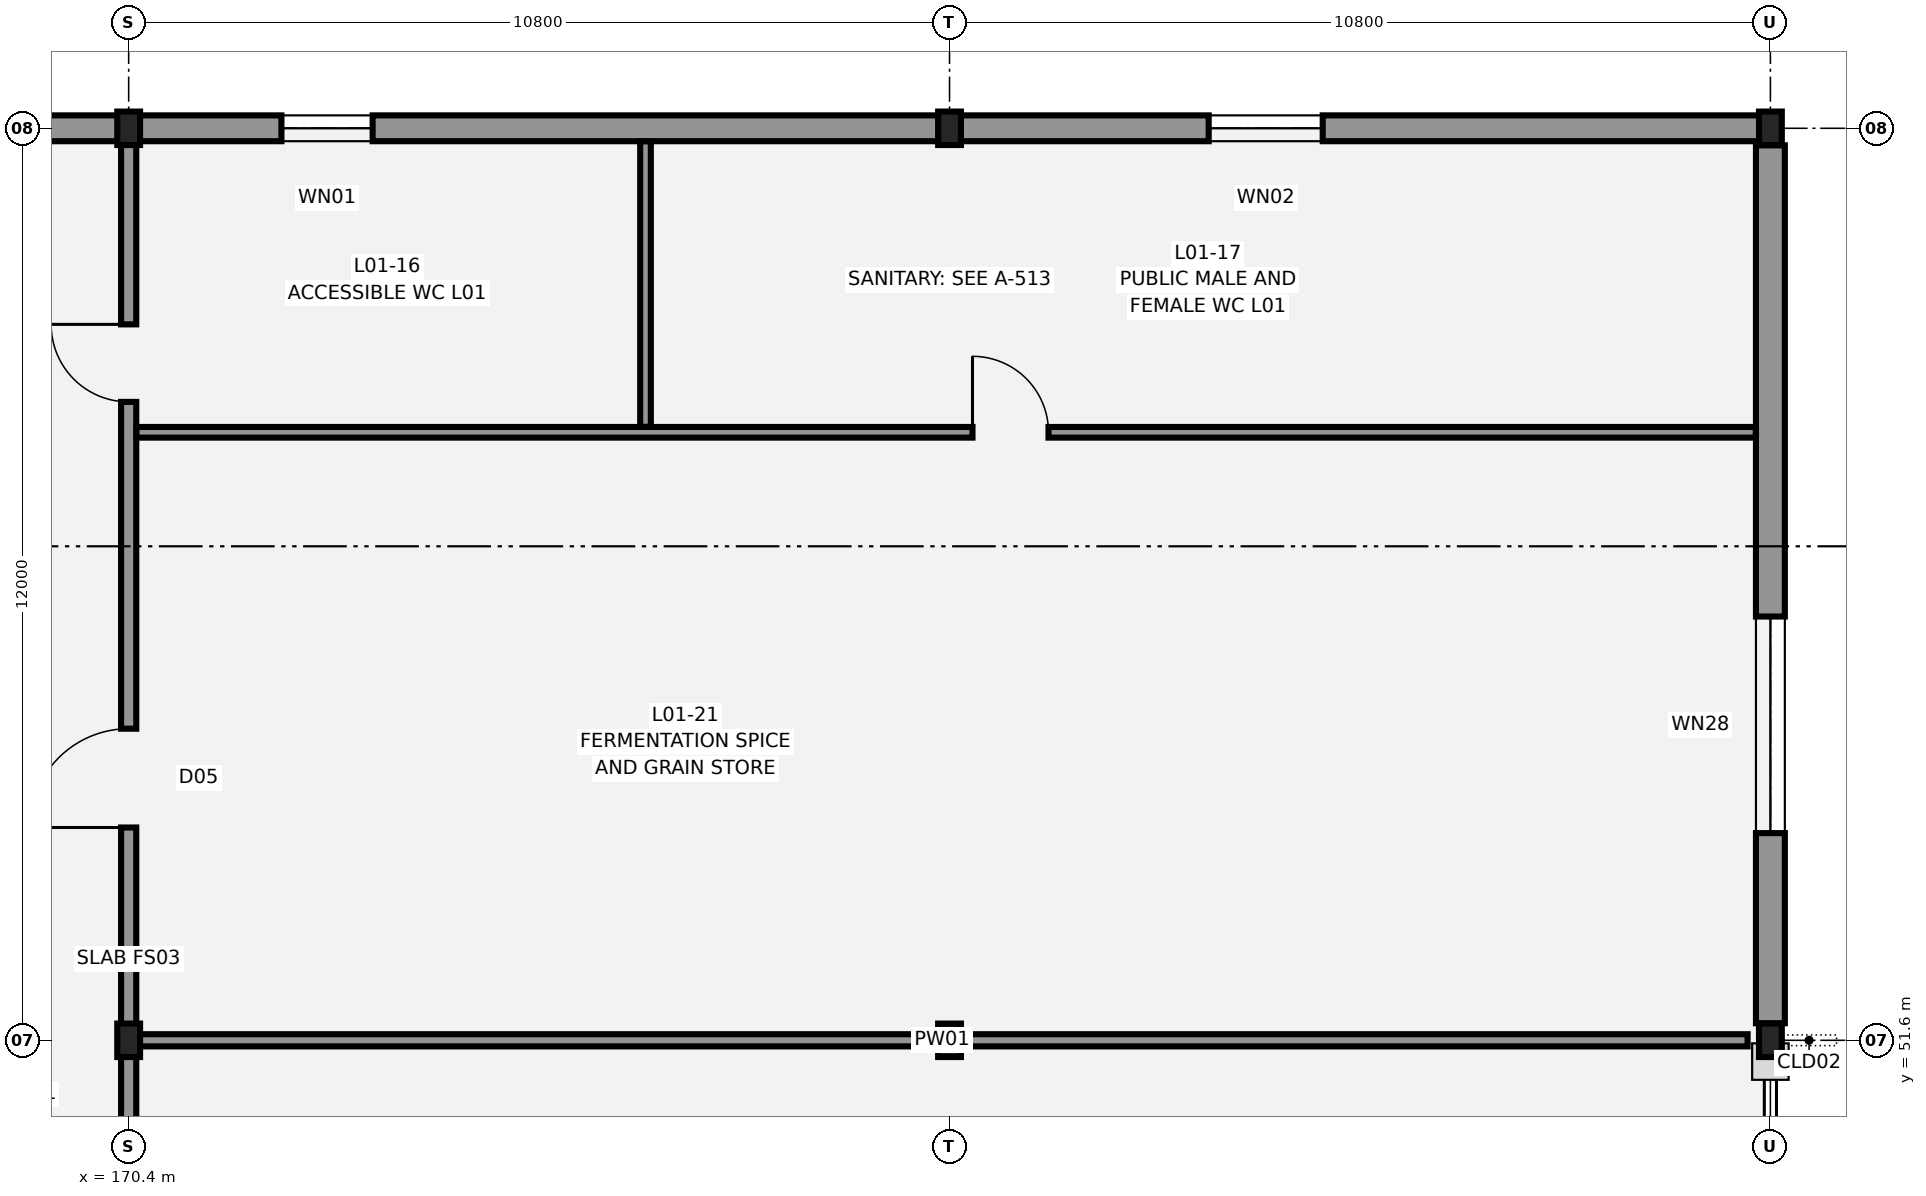
"""IFC4 building model, lengths in metres.
Left out: names, types, materials, properties, quantities, classifications, styles, units other than length and angle.
Written with IfcOpenShell. Run it as: python <this file> out.ifc"""

import sys

from ifc_helpers import new_model, si_unit, direction, frame, frame_2d, origin, origin_2d, place, context, subcontext, project, spatial, rectangle, i_section, extrude, element, fill, save


model = new_model("IFC4")
c1 = context("Model", 3, precision=1e-05, world=origin(), true_north=direction((0.0, 1.0)))
c2 = subcontext(c1, "Body", "Model", "MODEL_VIEW")
j1 = project(units=[si_unit("LENGTHUNIT", "METRE"), si_unit("PLANEANGLEUNIT", "RADIAN")], contexts=[c1])
p1 = place(None, origin())
s1 = spatial("IfcSite", under=j1, at=p1, CompositionType="ELEMENT")
p2 = place(p1, origin())
s2 = spatial("IfcBuilding", under=s1, at=p2, CompositionType="ELEMENT")
p3 = place(p2, frame((0.0, 0.0, 5.4)))
s3 = spatial("IfcBuildingStorey", under=s2, at=p3, CompositionType="ELEMENT", Elevation=5.4)
for number, where, z_axis, x_axis in (
    (1, (170.4, 51.6, 0.0), (0.0, 0.0, 1.0), (1.0, 0.0, 0.0)),
    (2, (170.4, 63.6, 0.0), (0.0, 0.0, 1.0), (1.0, 0.0, 0.0)),
    (3, (181.2, 51.6, 0.0), (0.0, 0.0, 1.0), (1.0, 0.0, 0.0)),
    (4, (181.2, 63.6, 0.0), (0.0, 0.0, 1.0), (1.0, 0.0, 0.0)),
    (5, (192.0, 51.6, 0.0), (0.0, 0.0, 1.0), (1.0, 0.0, 0.0)),
    (6, (192.0, 63.6, 0.0), (0.0, 0.0, 1.0), (1.0, 0.0, 0.0)),
):
    element("IfcColumn", number, at=place(p3, frame(where, z_axis=z_axis, x_axis=x_axis)), inside=s3, PredefinedType="COLUMN", context=c2, shape_type="SweptSolid", body=[
        extrude(i_section(OverallWidth=0.3, OverallDepth=0.44, WebThickness=0.011, FlangeThickness=0.021, FilletRadius=0.027, at=origin_2d()), origin(), (0.0, 0.0, 1.0), 4.8),
    ])
p4 = place(p3, frame((192.0, 63.376, 0.0), z_axis=(0.0, 0.0, 1.0), x_axis=(0.0, -1.0, 0.0)))
e7 = element("IfcWall", 7, at=p4, inside=s3, PredefinedType="STANDARD", context=c2, shape_type="SweptSolid", body=[
    extrude(rectangle(XDim=11.552, YDim=0.38, at=frame_2d((5.776, 0.0))), origin(), (0.0, 0.0, 1.0), 4.48),
])
p5 = place(p4, frame((6.2, 0.0, 0.8)))
e8 = element("IfcOpeningElement", 8, at=p5, cuts=e7, PredefinedType="OPENING", context=c2, shape_type="SweptSolid", body=[
    extrude(rectangle(XDim=2.85, YDim=1.65, at=frame_2d((1.425, 0.825))), frame((0.0, 0.2, 0.0), z_axis=(0.0, -1.0, 0.0), x_axis=(1.0, 0.0, 0.0)), (0.0, 0.0, 1.0), 0.4),
])
p6 = place(p3, frame((159.61, 63.6, 0.0), z_axis=(0.0, 0.0, 1.0), x_axis=(1.0, 0.0, 0.0)))
e9 = element("IfcWall", 9, at=p6, inside=s3, PredefinedType="STANDARD", context=c2, shape_type="SweptSolid", body=[
    extrude(rectangle(XDim=10.781, YDim=0.34, at=frame_2d((5.39, 0.0))), origin(), (0.0, 0.0, 1.0), 4.48),
])
p7 = place(p6, frame((3.4, 0.0, 0.8)))
e10 = element("IfcOpeningElement", 10, at=p7, cuts=e9, PredefinedType="OPENING", context=c2, shape_type="SweptSolid", body=[
    extrude(rectangle(XDim=1.75, YDim=1.5, at=frame_2d((0.875, 0.75))), frame((0.0, 0.18, 0.0), z_axis=(0.0, -1.0, 0.0), x_axis=(1.0, 0.0, 0.0)), (0.0, 0.0, 1.0), 0.36),
])
p8 = place(p3, frame((170.41, 63.6, 0.0), z_axis=(0.0, 0.0, 1.0), x_axis=(1.0, 0.0, 0.0)))
e11 = element("IfcWall", 11, at=p8, inside=s3, PredefinedType="STANDARD", context=c2, shape_type="SweptSolid", body=[
    extrude(rectangle(XDim=10.78, YDim=0.34, at=frame_2d((5.39, 0.0))), origin(), (0.0, 0.0, 1.0), 4.48),
])
p9 = place(p8, frame((2.0, 0.0, 0.8)))
e12 = element("IfcOpeningElement", 12, at=p9, cuts=e11, PredefinedType="OPENING", context=c2, shape_type="SweptSolid", body=[
    extrude(rectangle(XDim=1.2, YDim=1.8, at=frame_2d((0.6, 0.9))), frame((0.0, 0.18, 0.0), z_axis=(0.0, -1.0, 0.0), x_axis=(1.0, 0.0, 0.0)), (0.0, 0.0, 1.0), 0.36),
])
p10 = place(p3, frame((181.21, 63.6, 0.0), z_axis=(0.0, 0.0, 1.0), x_axis=(1.0, 0.0, 0.0)))
e13 = element("IfcWall", 13, at=p10, inside=s3, PredefinedType="STANDARD", context=c2, shape_type="SweptSolid", body=[
    extrude(rectangle(XDim=10.781, YDim=0.34, at=frame_2d((5.39, 0.0))), origin(), (0.0, 0.0, 1.0), 4.48),
])
p11 = place(p10, frame((3.4, 0.0, 0.8)))
e14 = element("IfcOpeningElement", 14, at=p11, cuts=e13, PredefinedType="OPENING", context=c2, shape_type="SweptSolid", body=[
    extrude(rectangle(XDim=1.5, YDim=1.8, at=frame_2d((0.75, 0.9))), frame((0.0, 0.18, 0.0), z_axis=(0.0, -1.0, 0.0), x_axis=(1.0, 0.0, 0.0)), (0.0, 0.0, 1.0), 0.36),
])
p12 = place(p3, frame((170.4, 6.8, 0.0), z_axis=(0.0, 0.0, 1.0), x_axis=(0.0, 1.0, 0.0)))
e15 = element("IfcWall", 15, at=p12, inside=s3, PredefinedType="PARTITIONING", context=c2, shape_type="SweptSolid", body=[
    extrude(rectangle(XDim=56.628, YDim=0.2, at=frame_2d((28.314, 0.0))), origin(), (0.0, 0.0, 1.0), 4.135),
])
p13 = place(p12, frame((3.2, 0.0, 0.0)))
e16 = element("IfcOpeningElement", 16, at=p13, cuts=e15, PredefinedType="OPENING", context=c2, shape_type="SweptSolid", body=[
    extrude(rectangle(XDim=1.05, YDim=2.15, at=frame_2d((0.525, 1.075))), frame((0.0, 0.11, 0.0), z_axis=(0.0, -1.0, 0.0), x_axis=(1.0, 0.0, 0.0)), (0.0, 0.0, 1.0), 0.22),
])
p14 = place(p12, frame((13.0, 0.0, 0.0)))
e17 = element("IfcOpeningElement", 17, at=p14, cuts=e15, PredefinedType="OPENING", context=c2, shape_type="SweptSolid", body=[
    extrude(rectangle(XDim=1.6, YDim=2.2, at=frame_2d((0.8, 1.1))), frame((0.0, 0.11, 0.0), z_axis=(0.0, -1.0, 0.0), x_axis=(1.0, 0.0, 0.0)), (0.0, 0.0, 1.0), 0.22),
])
p15 = place(p12, frame((26.0, 0.0, 0.0)))
e18 = element("IfcOpeningElement", 18, at=p15, cuts=e15, PredefinedType="OPENING", context=c2, shape_type="SweptSolid", body=[
    extrude(rectangle(XDim=1.3, YDim=2.15, at=frame_2d((0.65, 1.075))), frame((0.0, 0.11, 0.0), z_axis=(0.0, -1.0, 0.0), x_axis=(1.0, 0.0, 0.0)), (0.0, 0.0, 1.0), 0.22),
])
p16 = place(p12, frame((47.6, 0.0, 0.0)))
e19 = element("IfcOpeningElement", 19, at=p16, cuts=e15, PredefinedType="OPENING", context=c2, shape_type="SweptSolid", body=[
    extrude(rectangle(XDim=1.3, YDim=2.15, at=frame_2d((0.65, 1.075))), frame((0.0, 0.11, 0.0), z_axis=(0.0, -1.0, 0.0), x_axis=(1.0, 0.0, 0.0)), (0.0, 0.0, 1.0), 0.22),
])
p17 = place(p12, frame((53.2, 0.0, 0.0)))
e20 = element("IfcOpeningElement", 20, at=p17, cuts=e15, PredefinedType="OPENING", context=c2, shape_type="SweptSolid", body=[
    extrude(rectangle(XDim=1.02, YDim=2.12, at=frame_2d((0.51, 1.06))), frame((0.0, 0.11, 0.0), z_axis=(0.0, -1.0, 0.0), x_axis=(1.0, 0.0, 0.0)), (0.0, 0.0, 1.0), 0.22),
])
p18 = place(p12, frame((4.6, 0.0, 1.05)))
e21 = element("IfcOpeningElement", 21, at=p18, cuts=e15, PredefinedType="OPENING", context=c2, shape_type="SweptSolid", body=[
    extrude(rectangle(XDim=2.8, YDim=1.3, at=frame_2d((1.4, 0.65))), frame((0.0, 0.11, 0.0), z_axis=(0.0, -1.0, 0.0), x_axis=(1.0, 0.0, 0.0)), (0.0, 0.0, 1.0), 0.22),
])
p19 = place(p3, frame((170.502, 51.6, 0.0), z_axis=(0.0, 0.0, 1.0), x_axis=(1.0, 0.0, 0.0)))
e22 = element("IfcWall", 22, at=p19, inside=s3, PredefinedType="PARTITIONING", context=c2, shape_type="SweptSolid", body=[
    extrude(rectangle(XDim=21.198, YDim=0.16, at=frame_2d((10.599, 0.0))), origin(), (0.0, 0.0, 1.0), 4.44),
])
p20 = place(p3, frame((170.502, 59.6, 0.0), z_axis=(0.0, 0.0, 1.0), x_axis=(1.0, 0.0, 0.0)))
e23 = element("IfcWall", 23, at=p20, inside=s3, PredefinedType="PARTITIONING", context=c2, shape_type="SweptSolid", body=[
    extrude(rectangle(XDim=21.306, YDim=0.14, at=frame_2d((10.653, 0.0))), origin(), (0.0, 0.0, 1.0), 4.44),
])
p21 = place(p20, frame((11.0, 0.0, 0.0)))
e24 = element("IfcOpeningElement", 24, at=p21, cuts=e23, PredefinedType="OPENING", context=c2, shape_type="SweptSolid", body=[
    extrude(rectangle(XDim=1.0, YDim=2.1, at=frame_2d((0.5, 1.05))), frame((0.0, 0.08, 0.0), z_axis=(0.0, -1.0, 0.0), x_axis=(1.0, 0.0, 0.0)), (0.0, 0.0, 1.0), 0.16),
])
p22 = place(p3, frame((177.2, 59.672, 0.0), z_axis=(0.0, 0.0, 1.0), x_axis=(0.0, 1.0, 0.0)))
e25 = element("IfcWall", 25, at=p22, inside=s3, PredefinedType="PARTITIONING", context=c2, shape_type="SweptSolid", body=[
    extrude(rectangle(XDim=3.756, YDim=0.14, at=frame_2d((1.878, 0.0))), origin(), (0.0, 0.0, 1.0), 4.44),
])
p23 = place(p5, origin())
e26 = element("IfcWindow", 26, at=p23, inside=s3, PartitioningType="SINGLE_PANEL", PredefinedType="WINDOW", context=c2, shape_type="SweptSolid", body=[
    extrude(rectangle(XDim=2.85, YDim=1.65, at=frame_2d((1.425, 0.825))), frame((0.0, 0.03, 0.0), z_axis=(0.0, -1.0, 0.0), x_axis=(1.0, 0.0, 0.0)), (0.0, 0.0, 1.0), 0.06),
])
fill(e8, e26)
p24 = place(p9, origin())
e27 = element("IfcWindow", 27, at=p24, inside=s3, PartitioningType="SINGLE_PANEL", PredefinedType="WINDOW", context=c2, shape_type="SweptSolid", body=[
    extrude(rectangle(XDim=1.2, YDim=1.8, at=frame_2d((0.6, 0.9))), frame((0.0, 0.03, 0.0), z_axis=(0.0, -1.0, 0.0), x_axis=(1.0, 0.0, 0.0)), (0.0, 0.0, 1.0), 0.06),
])
fill(e12, e27)
p25 = place(p11, origin())
e28 = element("IfcWindow", 28, at=p25, inside=s3, PartitioningType="SINGLE_PANEL", PredefinedType="WINDOW", context=c2, shape_type="SweptSolid", body=[
    extrude(rectangle(XDim=1.5, YDim=1.8, at=frame_2d((0.75, 0.9))), frame((0.0, 0.03, 0.0), z_axis=(0.0, -1.0, 0.0), x_axis=(1.0, 0.0, 0.0)), (0.0, 0.0, 1.0), 0.06),
])
fill(e14, e28)
p26 = place(p16, origin())
e29 = element("IfcDoor", 29, at=p26, inside=s3, OperationType="SINGLE_SWING_LEFT", PredefinedType="DOOR", context=c2, shape_type="SweptSolid", body=[
    extrude(rectangle(XDim=1.3, YDim=2.15, at=frame_2d((0.65, 1.075))), frame((0.0, 0.025, 0.0), z_axis=(0.0, -1.0, 0.0), x_axis=(1.0, 0.0, 0.0)), (0.0, 0.0, 1.0), 0.05),
])
fill(e19, e29)
p27 = place(p17, origin())
e30 = element("IfcDoor", 30, at=p27, inside=s3, OperationType="SINGLE_SWING_RIGHT", PredefinedType="DOOR", context=c2, shape_type="SweptSolid", body=[
    extrude(rectangle(XDim=1.02, YDim=2.12, at=frame_2d((0.51, 1.06))), frame((0.0, 0.025, 0.0), z_axis=(0.0, -1.0, 0.0), x_axis=(1.0, 0.0, 0.0)), (0.0, 0.0, 1.0), 0.05),
])
fill(e20, e30)
p28 = place(p21, origin())
e31 = element("IfcDoor", 31, at=p28, inside=s3, OperationType="SINGLE_SWING_LEFT", PredefinedType="DOOR", context=c2, shape_type="SweptSolid", body=[
    extrude(rectangle(XDim=1.0, YDim=2.1, at=frame_2d((0.5, 1.05))), frame((0.0, 0.025, 0.0), z_axis=(0.0, -1.0, 0.0), x_axis=(1.0, 0.0, 0.0)), (0.0, 0.0, 1.0), 0.05),
])
fill(e24, e31)
save(model, sys.argv[1])
